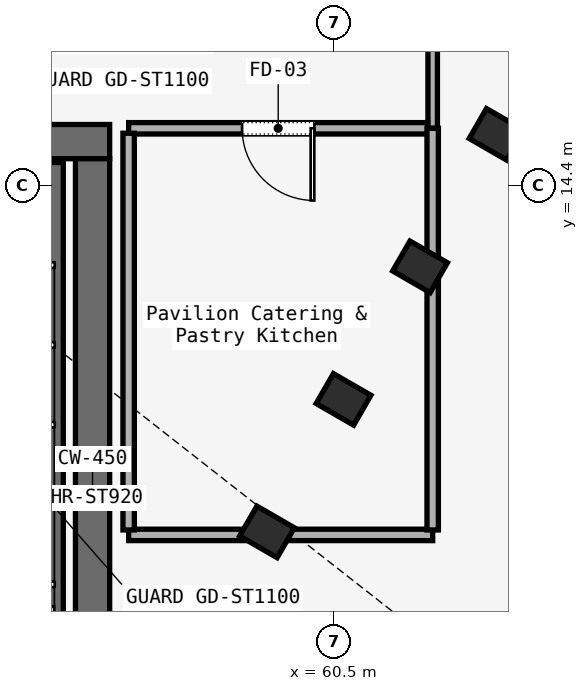
"""IFC4 building model, lengths in metres.
Left out: names, types, materials, properties, quantities, classifications, styles, units other than length and angle.
Written with IfcOpenShell. Run it as: python <this file> out.ifc"""

import sys

from ifc_helpers import new_model, si_unit, direction, frame, frame_2d, origin, origin_2d, place, context, subcontext, project, spatial, rectangle, i_section, extrude, element, fill, save


model = new_model("IFC4")
c1 = context("Model", 3, precision=1e-05, world=origin(), true_north=direction((0.0, 1.0)))
c2 = subcontext(c1, "Body", "Model", "MODEL_VIEW")
j1 = project(units=[si_unit("LENGTHUNIT", "METRE"), si_unit("PLANEANGLEUNIT", "RADIAN")], contexts=[c1])
p1 = place(None, origin())
s1 = spatial("IfcSite", under=j1, at=p1, CompositionType="ELEMENT")
p2 = place(p1, origin())
s2 = spatial("IfcBuilding", under=s1, at=p2, CompositionType="ELEMENT")
p3 = place(p2, frame((0.0, 0.0, 30.0)))
s3 = spatial("IfcBuildingStorey", under=s2, at=p3, CompositionType="ELEMENT", Elevation=30.0)
p4 = place(p3, frame((26.45, 14.975, 0.0), z_axis=(0.0, 0.0, 1.0), x_axis=(1.0, 0.0, 0.0)))
e1 = element("IfcWall", 1, at=p4, inside=s3, PredefinedType="SOLIDWALL", context=c2, shape_type="SweptSolid", body=[
    extrude(rectangle(XDim=31.1, YDim=0.45, at=frame_2d((15.55, 0.0))), origin(), (0.0, 0.0, 1.0), 5.78),
])
p5 = place(p4, frame((1.65, 0.0, 0.0)))
e2 = element("IfcOpeningElement", 2, at=p5, cuts=e1, PredefinedType="OPENING", context=c2, shape_type="SweptSolid", body=[
    extrude(rectangle(XDim=1.1, YDim=2.2, at=frame_2d((0.55, 1.1))), frame((0.0, 0.225, 0.0), z_axis=(0.0, -1.0, 0.0), x_axis=(1.0, 0.0, 0.0)), (0.0, 0.0, 1.0), 0.45),
])
p6 = place(p4, frame((13.65, 0.0, 0.0)))
e3 = element("IfcOpeningElement", 3, at=p6, cuts=e1, PredefinedType="OPENING", context=c2, shape_type="SweptSolid", body=[
    extrude(rectangle(XDim=1.1, YDim=2.2, at=frame_2d((0.55, 1.1))), frame((0.0, 0.225, 0.0), z_axis=(0.0, -1.0, 0.0), x_axis=(1.0, 0.0, 0.0)), (0.0, 0.0, 1.0), 0.45),
])
p7 = place(p4, frame((25.55, 0.0, 0.0)))
e4 = element("IfcOpeningElement", 4, at=p7, cuts=e1, PredefinedType="OPENING", context=c2, shape_type="SweptSolid", body=[
    extrude(rectangle(XDim=1.1, YDim=2.2, at=frame_2d((0.55, 1.1))), frame((0.0, 0.225, 0.0), z_axis=(0.0, -1.0, 0.0), x_axis=(1.0, 0.0, 0.0)), (0.0, 0.0, 1.0), 0.45),
])
p8 = place(p4, frame((10.7, 0.0, 0.0)))
e5 = element("IfcOpeningElement", 5, at=p8, cuts=e1, PredefinedType="OPENING", context=c2, shape_type="SweptSolid", body=[
    extrude(rectangle(XDim=1.4, YDim=2.2, at=frame_2d((0.7, 1.1))), frame((0.0, 0.225, 0.0), z_axis=(0.0, -1.0, 0.0), x_axis=(1.0, 0.0, 0.0)), (0.0, 0.0, 1.0), 0.45),
])
p9 = place(p4, frame((19.35, 0.0, 0.0)))
e6 = element("IfcOpeningElement", 6, at=p9, cuts=e1, PredefinedType="OPENING", context=c2, shape_type="SweptSolid", body=[
    extrude(rectangle(XDim=1.1, YDim=2.2, at=frame_2d((0.55, 1.1))), frame((0.0, 0.225, 0.0), z_axis=(0.0, -1.0, 0.0), x_axis=(1.0, 0.0, 0.0)), (0.0, 0.0, 1.0), 0.45),
])
p10 = place(p4, frame((21.4, 0.0, 0.0)))
e7 = element("IfcOpeningElement", 7, at=p10, cuts=e1, PredefinedType="OPENING", context=c2, shape_type="SweptSolid", body=[
    extrude(rectangle(XDim=0.9, YDim=2.1, at=frame_2d((0.45, 1.05))), frame((0.0, 0.225, 0.0), z_axis=(0.0, -1.0, 0.0), x_axis=(1.0, 0.0, 0.0)), (0.0, 0.0, 1.0), 0.45),
])
p11 = place(p4, frame((23.35, 0.0, 0.0)))
e8 = element("IfcOpeningElement", 8, at=p11, cuts=e1, PredefinedType="OPENING", context=c2, shape_type="SweptSolid", body=[
    extrude(rectangle(XDim=1.3, YDim=2.3, at=frame_2d((0.65, 1.15))), frame((0.0, 0.225, 0.0), z_axis=(0.0, -1.0, 0.0), x_axis=(1.0, 0.0, 0.0)), (0.0, 0.0, 1.0), 0.45),
])
p12 = place(p3, frame((57.325, 5.85, 0.0), z_axis=(0.0, 0.0, 1.0), x_axis=(0.0, 1.0, 0.0)))
e9 = element("IfcWall", 9, at=p12, inside=s3, PredefinedType="SOLIDWALL", context=c2, shape_type="SweptSolid", body=[
    extrude(rectangle(XDim=8.9, YDim=0.45, at=frame_2d((4.45, 0.0))), origin(), (0.0, 0.0, 1.0), 5.78),
])
for number, where, z_axis, x_axis in (
    (10, (59.62, 9.839, 0.0), (0.0, 0.0, 1.0), (0.5, 0.866, 0.0)),
    (11, (60.627, 11.583, 0.0), (0.0, 0.0, 1.0), (0.5, 0.866, 0.0)),
    (12, (61.634, 13.327, 0.0), (0.0, 0.0, 1.0), (0.5, 0.866, 0.0)),
    (13, (62.641, 15.071, 0.0), (0.0, 0.0, 1.0), (0.5, 0.866, 0.0)),
):
    element("IfcColumn", number, at=place(p3, frame(where, z_axis=z_axis, x_axis=x_axis)), inside=s3, PredefinedType="COLUMN", context=c2, shape_type="SweptSolid", body=[
        extrude(i_section(OverallWidth=0.454, OverallDepth=0.569, WebThickness=0.078, FlangeThickness=0.08, FilletRadius=0.015, at=origin_2d()), origin(), (0.0, 0.0, 1.0), 6.0),
    ])
p13 = place(p3, frame((56.84, 14.7, 0.0), z_axis=(0.0, 0.0, 1.0), x_axis=(0.0, -1.0, 0.0)))
e14 = element("IfcWall", 14, at=p13, inside=s3, PredefinedType="SOLIDWALL", context=c2, shape_type="SweptSolid", body=[
    extrude(rectangle(XDim=7.65, YDim=0.2, at=frame_2d((3.825, 0.0))), origin(), (0.0, 0.0, 1.0), 6.0),
])
p14 = place(p3, frame((61.8, 17.3, 0.0), z_axis=(0.0, 0.0, 1.0), x_axis=(0.0, -1.0, 0.0)))
e15 = element("IfcWall", 15, at=p14, inside=s3, PredefinedType="PARTITIONING", context=c2, shape_type="SweptSolid", body=[
    extrude(rectangle(XDim=2.15, YDim=0.125, at=frame_2d((1.075, 0.0))), origin(), (0.0, 0.0, 1.0), 5.133),
])
p15 = place(p3, frame((61.735, 15.15, 0.0), z_axis=(0.0, 0.0, 1.0), x_axis=(-1.0, 0.0, 0.0)))
e16 = element("IfcWall", 16, at=p15, inside=s3, PredefinedType="PARTITIONING", context=c2, shape_type="SweptSolid", body=[
    extrude(rectangle(XDim=3.935, YDim=0.15, at=frame_2d((1.968, 0.0))), origin(), (0.0, 0.0, 1.0), 5.133),
])
p16 = place(p15, frame((1.492, 0.0, 0.0)))
e17 = element("IfcOpeningElement", 17, at=p16, cuts=e16, PredefinedType="OPENING", context=c2, shape_type="SweptSolid", body=[
    extrude(rectangle(XDim=0.95, YDim=2.2, at=frame_2d((0.475, 1.1))), frame((0.0, 0.075, 0.0), z_axis=(0.0, -1.0, 0.0), x_axis=(1.0, 0.0, 0.0)), (0.0, 0.0, 1.0), 0.15),
])
p17 = place(p3, frame((61.8, 9.8, 0.0), z_axis=(0.0, 0.0, 1.0), x_axis=(-1.0, 0.0, 0.0)))
e18 = element("IfcWall", 18, at=p17, inside=s3, PredefinedType="PARTITIONING", context=c2, shape_type="SweptSolid", body=[
    extrude(rectangle(XDim=4.0, YDim=0.15, at=frame_2d((2.0, 0.0))), origin(), (0.0, 0.0, 1.0), 5.133),
])
p18 = place(p3, frame((57.8, 9.865, 0.0), z_axis=(0.0, 0.0, 1.0), x_axis=(0.0, 1.0, 0.0)))
e19 = element("IfcWall", 19, at=p18, inside=s3, PredefinedType="PARTITIONING", context=c2, shape_type="SweptSolid", body=[
    extrude(rectangle(XDim=5.22, YDim=0.15, at=frame_2d((2.61, 0.0))), origin(), (0.0, 0.0, 1.0), 5.133),
])
p19 = place(p3, frame((61.8, 15.15, 0.0), z_axis=(0.0, 0.0, 1.0), x_axis=(0.0, -1.0, 0.0)))
e20 = element("IfcWall", 20, at=p19, inside=s3, PredefinedType="PARTITIONING", context=c2, shape_type="SweptSolid", body=[
    extrude(rectangle(XDim=5.285, YDim=0.15, at=frame_2d((2.643, 0.0))), origin(), (0.0, 0.0, 1.0), 5.133),
])
p20 = place(p16, origin())
e21 = element("IfcDoor", 21, at=p20, inside=s3, OperationType="SINGLE_SWING_LEFT", PredefinedType="DOOR", context=c2, shape_type="SweptSolid", body=[
    extrude(rectangle(XDim=0.95, YDim=2.2, at=frame_2d((0.475, 1.1))), frame((0.0, 0.025, 0.0), z_axis=(0.0, -1.0, 0.0), x_axis=(1.0, 0.0, 0.0)), (0.0, 0.0, 1.0), 0.05),
])
fill(e17, e21)
save(model, sys.argv[1])
